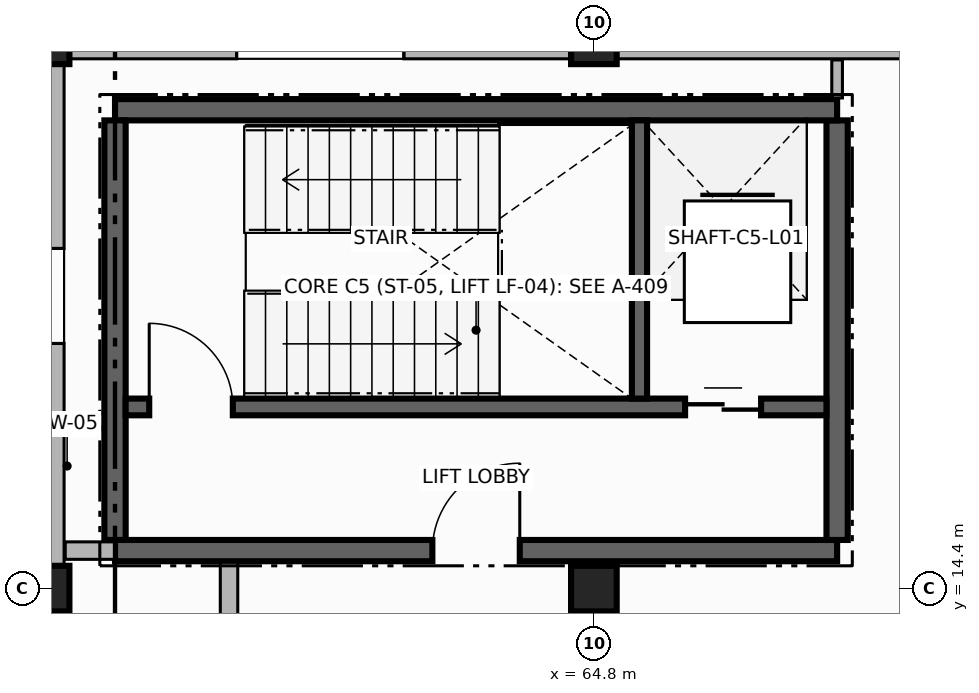
"""IFC4 building model, lengths in metres.
Left out: names, types, materials, properties, quantities, classifications, styles, units other than length and angle.
Written with IfcOpenShell. Run it as: python <this file> out.ifc"""

import sys

from ifc_helpers import new_model, si_unit, direction, frame, frame_2d, origin, origin_2d, place, context, subcontext, project, spatial, rectangle, extrude, element, fill, save


model = new_model("IFC4")
c1 = context("Model", 3, precision=1e-05, world=origin(), true_north=direction((0.0, 1.0)))
c2 = subcontext(c1, "Body", "Model", "MODEL_VIEW")
j1 = project(units=[si_unit("LENGTHUNIT", "METRE"), si_unit("PLANEANGLEUNIT", "RADIAN")], contexts=[c1])
p1 = place(None, origin())
s1 = spatial("IfcSite", under=j1, at=p1, CompositionType="ELEMENT")
p2 = place(p1, origin())
s2 = spatial("IfcBuilding", under=s1, at=p2, CompositionType="ELEMENT")
p3 = place(p2, frame((0.0, 0.0, 4.5)))
s3 = spatial("IfcBuildingStorey", under=s2, at=p3, CompositionType="ELEMENT", Elevation=4.5)
for number, where, z_axis, x_axis in (
    (1, (57.6, 14.4, 0.0), (0.0, 0.0, 1.0), (1.0, 0.0, 0.0)),
    (2, (57.6, 21.6, 0.0), (0.0, 0.0, 1.0), (1.0, 0.0, 0.0)),
    (3, (64.8, 14.4, 0.0), (0.0, 0.0, 1.0), (1.0, 0.0, 0.0)),
    (4, (64.8, 21.6, 0.0), (0.0, 0.0, 1.0), (1.0, 0.0, 0.0)),
):
    element("IfcColumn", number, at=place(p3, frame(where, z_axis=z_axis, x_axis=x_axis)), inside=s3, PredefinedType="COLUMN", context=c2, shape_type="SweptSolid", body=[
        extrude(rectangle(XDim=0.6, YDim=0.6, at=origin_2d()), origin(), (0.0, 0.0, 1.0), 3.55),
    ])
p4 = place(p3, frame((72.0, 21.6, 0.0), z_axis=(0.0, 0.0, 1.0), x_axis=(-1.0, 0.0, 0.0)))
e5 = element("IfcWall", 5, at=p4, inside=s3, PredefinedType="SOLIDWALL", context=c2, shape_type="SweptSolid", body=[
    extrude(rectangle(XDim=7.2, YDim=0.46, at=frame_2d((3.6, 0.0))), origin(), (0.0, 0.0, 1.0), 2.83),
])
p5 = place(p4, frame((0.9, 0.0, 1.2)))
e6 = element("IfcOpeningElement", 6, at=p5, cuts=e5, PredefinedType="OPENING", context=c2, shape_type="SweptSolid", body=[
    extrude(rectangle(XDim=2.2, YDim=1.1, at=frame_2d((1.1, 0.55))), frame((0.0, 0.24, 0.0), z_axis=(0.0, -1.0, 0.0), x_axis=(1.0, 0.0, 0.0)), (0.0, 0.0, 1.0), 0.48),
])
p6 = place(p3, frame((64.8, 21.6, 0.0), z_axis=(0.0, 0.0, 1.0), x_axis=(-1.0, 0.0, 0.0)))
e7 = element("IfcWall", 7, at=p6, inside=s3, PredefinedType="SOLIDWALL", context=c2, shape_type="SweptSolid", body=[
    extrude(rectangle(XDim=7.2, YDim=0.46, at=frame_2d((3.6, 0.0))), origin(), (0.0, 0.0, 1.0), 2.83),
])
p7 = place(p6, frame((2.5, 0.0, 1.2)))
e8 = element("IfcOpeningElement", 8, at=p7, cuts=e7, PredefinedType="OPENING", context=c2, shape_type="SweptSolid", body=[
    extrude(rectangle(XDim=2.2, YDim=1.1, at=frame_2d((1.1, 0.55))), frame((0.0, 0.24, 0.0), z_axis=(0.0, -1.0, 0.0), x_axis=(1.0, 0.0, 0.0)), (0.0, 0.0, 1.0), 0.48),
])
p8 = place(p3, frame((57.6, 21.6, 0.0), z_axis=(0.0, 0.0, 1.0), x_axis=(0.0, -1.0, 0.0)))
e9 = element("IfcWall", 9, at=p8, inside=s3, PredefinedType="SOLIDWALL", context=c2, shape_type="SweptSolid", body=[
    extrude(rectangle(XDim=7.2, YDim=0.46, at=frame_2d((3.6, 0.0))), origin(), (0.0, 0.0, 1.0), 2.83),
])
p9 = place(p8, frame((2.725, 0.0, 1.2)))
e10 = element("IfcOpeningElement", 10, at=p9, cuts=e9, PredefinedType="OPENING", context=c2, shape_type="SweptSolid", body=[
    extrude(rectangle(XDim=1.25, YDim=1.35, at=frame_2d((0.625, 0.675))), frame((0.0, 0.24, 0.0), z_axis=(0.0, -1.0, 0.0), x_axis=(1.0, 0.0, 0.0)), (0.0, 0.0, 1.0), 0.48),
])
p10 = place(p3, frame((57.6, 14.4, 0.0), z_axis=(0.0, 0.0, 1.0), x_axis=(0.0, -1.0, 0.0)))
e11 = element("IfcWall", 11, at=p10, inside=s3, PredefinedType="SOLIDWALL", context=c2, shape_type="SweptSolid", body=[
    extrude(rectangle(XDim=7.2, YDim=0.46, at=frame_2d((3.6, 0.0))), origin(), (0.0, 0.0, 1.0), 2.83),
])
p11 = place(p10, frame((4.5, 0.0, 0.0)))
e12 = element("IfcOpeningElement", 12, at=p11, cuts=e11, PredefinedType="OPENING", context=c2, shape_type="SweptSolid", body=[
    extrude(rectangle(XDim=1.4, YDim=2.25, at=frame_2d((0.7, 1.125))), frame((0.0, 0.24, 0.0), z_axis=(0.0, -1.0, 0.0), x_axis=(1.0, 0.0, 0.0)), (0.0, 0.0, 1.0), 0.48),
])
p12 = place(p3, frame((58.5, 14.9, 0.0), z_axis=(0.0, 0.0, 1.0), x_axis=(1.0, 0.0, 0.0)))
e13 = element("IfcWall", 13, at=p12, inside=s3, PredefinedType="SHEAR", context=c2, shape_type="SweptSolid", body=[
    extrude(rectangle(XDim=9.5, YDim=0.28, at=frame_2d((4.75, 0.0))), origin(), (0.0, 0.0, 1.0), 3.55),
])
p13 = place(p12, frame((4.175, 0.0, 0.0)))
e14 = element("IfcOpeningElement", 14, at=p13, cuts=e13, PredefinedType="OPENING", context=c2, shape_type="SweptSolid", body=[
    extrude(rectangle(XDim=1.15, YDim=2.2, at=frame_2d((0.575, 1.1))), frame((0.0, 0.15, 0.0), z_axis=(0.0, -1.0, 0.0), x_axis=(1.0, 0.0, 0.0)), (0.0, 0.0, 1.0), 0.3),
])
p14 = place(p3, frame((68.0, 15.04, 0.0), z_axis=(0.0, 0.0, 1.0), x_axis=(0.0, 1.0, 0.0)))
e15 = element("IfcWall", 15, at=p14, inside=s3, PredefinedType="SHEAR", context=c2, shape_type="SweptSolid", body=[
    extrude(rectangle(XDim=5.52, YDim=0.28, at=frame_2d((2.76, 0.0))), origin(), (0.0, 0.0, 1.0), 3.55),
])
p15 = place(p3, frame((68.0, 20.7, 0.0), z_axis=(0.0, 0.0, 1.0), x_axis=(-1.0, 0.0, 0.0)))
e16 = element("IfcWall", 16, at=p15, inside=s3, PredefinedType="SHEAR", context=c2, shape_type="SweptSolid", body=[
    extrude(rectangle(XDim=9.5, YDim=0.28, at=frame_2d((4.75, 0.0))), origin(), (0.0, 0.0, 1.0), 3.55),
])
p16 = place(p3, frame((58.5, 20.56, 0.0), z_axis=(0.0, 0.0, 1.0), x_axis=(0.0, -1.0, 0.0)))
e17 = element("IfcWall", 17, at=p16, inside=s3, PredefinedType="SHEAR", context=c2, shape_type="SweptSolid", body=[
    extrude(rectangle(XDim=5.52, YDim=0.28, at=frame_2d((2.76, 0.0))), origin(), (0.0, 0.0, 1.0), 3.55),
])
p17 = place(p3, frame((58.64, 16.79, 0.0), z_axis=(0.0, 0.0, 1.0), x_axis=(1.0, 0.0, 0.0)))
e18 = element("IfcWall", 18, at=p17, inside=s3, PredefinedType="SHEAR", context=c2, shape_type="SweptSolid", body=[
    extrude(rectangle(XDim=9.22, YDim=0.22, at=frame_2d((4.61, 0.0))), origin(), (0.0, 0.0, 1.0), 3.55),
])
p18 = place(p17, frame((0.31, 0.0, 0.0)))
e19 = element("IfcOpeningElement", 19, at=p18, cuts=e18, PredefinedType="OPENING", context=c2, shape_type="SweptSolid", body=[
    extrude(rectangle(XDim=1.1, YDim=2.15, at=frame_2d((0.55, 1.075))), frame((0.0, 0.12, 0.0), z_axis=(0.0, -1.0, 0.0), x_axis=(1.0, 0.0, 0.0)), (0.0, 0.0, 1.0), 0.24),
])
p19 = place(p17, frame((7.36, 0.0, 0.0)))
e20 = element("IfcOpeningElement", 20, at=p19, cuts=e18, PredefinedType="OPENING", context=c2, shape_type="SweptSolid", body=[
    extrude(rectangle(XDim=1.0, YDim=2.2, at=frame_2d((0.5, 1.1))), frame((0.0, 0.12, 0.0), z_axis=(0.0, -1.0, 0.0), x_axis=(1.0, 0.0, 0.0)), (0.0, 0.0, 1.0), 0.24),
])
p20 = place(p3, frame((65.4, 16.9, 0.0), z_axis=(0.0, 0.0, 1.0), x_axis=(0.0, 1.0, 0.0)))
e21 = element("IfcWall", 21, at=p20, inside=s3, PredefinedType="SHEAR", context=c2, shape_type="SweptSolid", body=[
    extrude(rectangle(XDim=3.66, YDim=0.2, at=frame_2d((1.83, 0.0))), origin(), (0.0, 0.0, 1.0), 3.55),
])
p21 = place(p3, frame((57.845, 14.9, 0.0), z_axis=(0.0, 0.0, 1.0), x_axis=(1.0, 0.0, 0.0)))
e22 = element("IfcWall", 22, at=p21, inside=s3, PredefinedType="PARTITIONING", context=c2, shape_type="SweptSolid", body=[
    extrude(rectangle(XDim=0.655, YDim=0.23, at=frame_2d((0.328, 0.0))), origin(), (0.0, 0.0, 1.0), 2.81),
])
p22 = place(p3, frame((60.0, 14.745, 0.0), z_axis=(0.0, 0.0, 1.0), x_axis=(0.0, -1.0, 0.0)))
e23 = element("IfcWall", 23, at=p22, inside=s3, PredefinedType="PARTITIONING", context=c2, shape_type="SweptSolid", body=[
    extrude(rectangle(XDim=4.445, YDim=0.23, at=frame_2d((2.223, 0.0))), origin(), (0.0, 0.0, 1.0), 2.81),
])
p23 = place(p22, frame((2.365, 0.0, 0.0)))
e24 = element("IfcOpeningElement", 24, at=p23, cuts=e23, PredefinedType="OPENING", context=c2, shape_type="SweptSolid", body=[
    extrude(rectangle(XDim=1.6, YDim=2.3, at=frame_2d((0.8, 1.15))), frame((0.0, 0.125, 0.0), z_axis=(0.0, -1.0, 0.0), x_axis=(1.0, 0.0, 0.0)), (0.0, 0.0, 1.0), 0.25),
])
p24 = place(p3, frame((64.8, 10.394, 0.0), z_axis=(0.0, 0.0, 1.0), x_axis=(0.0, 1.0, 0.0)))
e25 = element("IfcWall", 25, at=p24, inside=s3, PredefinedType="PARTITIONING", context=c2, shape_type="SweptSolid", body=[
    extrude(rectangle(XDim=4.351, YDim=0.14, at=frame_2d((2.176, 0.0))), origin(), (0.0, 0.0, 1.0), 2.81),
])
p25 = place(p3, frame((68.0, 20.855, 0.0), z_axis=(0.0, 0.0, 1.0), x_axis=(0.0, 1.0, 0.0)))
e26 = element("IfcWall", 26, at=p25, inside=s3, PredefinedType="PARTITIONING", context=c2, shape_type="SweptSolid", body=[
    extrude(rectangle(XDim=0.5, YDim=0.14, at=frame_2d((0.25, 0.0))), origin(), (0.0, 0.0, 1.0), 2.81),
])
p26 = place(p18, origin())
e27 = element("IfcDoor", 27, at=p26, inside=s3, OperationType="SINGLE_SWING_LEFT", PredefinedType="DOOR", context=c2, shape_type="SweptSolid", body=[
    extrude(rectangle(XDim=1.1, YDim=2.15, at=frame_2d((0.55, 1.075))), frame((0.0, 0.025, 0.0), z_axis=(0.0, -1.0, 0.0), x_axis=(1.0, 0.0, 0.0)), (0.0, 0.0, 1.0), 0.05),
])
fill(e19, e27)
p27 = place(p19, origin())
e28 = element("IfcDoor", 28, at=p27, inside=s3, OperationType="DOUBLE_DOOR_SLIDING", PredefinedType="DOOR", context=c2, shape_type="SweptSolid", body=[
    extrude(rectangle(XDim=1.0, YDim=2.2, at=frame_2d((0.5, 1.1))), frame((0.0, 0.025, 0.0), z_axis=(0.0, -1.0, 0.0), x_axis=(1.0, 0.0, 0.0)), (0.0, 0.0, 1.0), 0.05),
])
fill(e20, e28)
p28 = place(p13, origin())
e29 = element("IfcDoor", 29, at=p28, inside=s3, OperationType="SINGLE_SWING_RIGHT", PredefinedType="DOOR", context=c2, shape_type="SweptSolid", body=[
    extrude(rectangle(XDim=1.15, YDim=2.2, at=frame_2d((0.575, 1.1))), frame((0.0, 0.025, 0.0), z_axis=(0.0, -1.0, 0.0), x_axis=(1.0, 0.0, 0.0)), (0.0, 0.0, 1.0), 0.05),
])
fill(e14, e29)
save(model, sys.argv[1])
